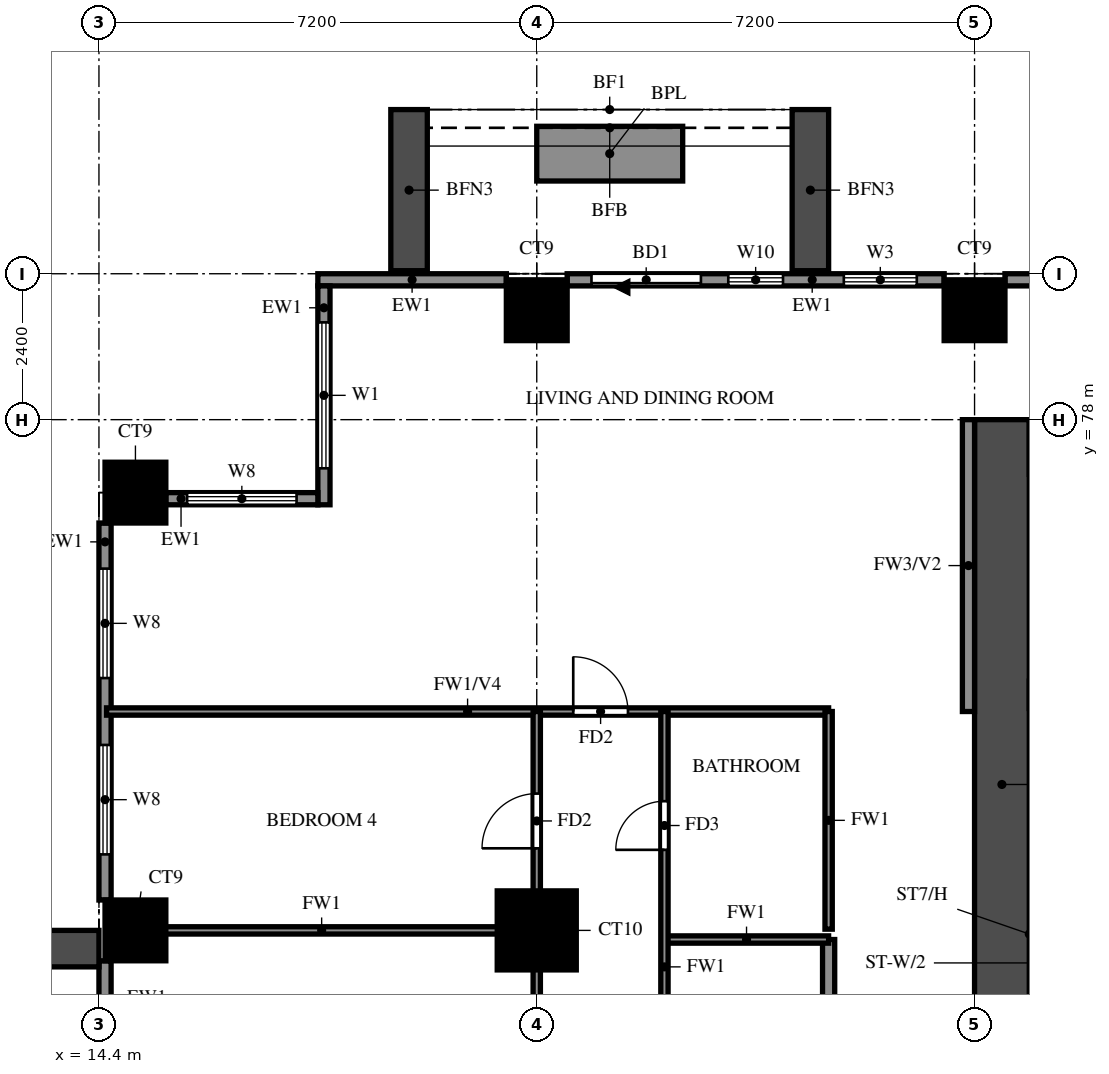
"""IFC4 building model, lengths in metres.
Left out: names, types, materials, properties, quantities, classifications, styles, units other than length and angle.
Written with IfcOpenShell. Run it as: python <this file> out.ifc"""

import sys

from ifc_helpers import new_model, si_unit, direction, frame, frame_2d, origin, origin_2d, place, context, subcontext, project, spatial, rectangle, extrude, source, transform, mapped, element, fill, save


model = new_model("IFC4")
c1 = context("Model", 3, precision=1e-05, world=origin(), true_north=direction((0.0, 1.0)))
c2 = subcontext(c1, "Body", "Model", "MODEL_VIEW")
j1 = project(units=[si_unit("LENGTHUNIT", "METRE"), si_unit("PLANEANGLEUNIT", "RADIAN")], contexts=[c1])
p1 = place(None, origin())
s1 = spatial("IfcSite", under=j1, at=p1, CompositionType="ELEMENT")
p2 = place(p1, origin())
s2 = spatial("IfcBuilding", under=s1, at=p2, CompositionType="ELEMENT")
p3 = place(p2, frame((0.0, 0.0, 79.5)))
s3 = spatial("IfcBuildingStorey", under=s2, at=p3, CompositionType="ELEMENT", Elevation=79.5)
m1 = source(origin(), c2, "Body", "SweptSolid", [
    extrude(rectangle(XDim=1.0, YDim=1.0, at=origin_2d()), origin(), (0.0, 0.0, 1.0), 3.18),
])
p4 = place(p3, frame((15.0, 69.6, 0.0), z_axis=(0.0, 0.0, 1.0), x_axis=(1.0, 0.0, 0.0)))
e1 = element("IfcColumn", 1, at=p4, inside=s3, PredefinedType="COLUMN", context=c2, shape_type="MappedRepresentation", body=[
    mapped(m1, transform((0.0, 0.0, 0.0))),
])
m2 = source(origin(), c2, "Body", "SweptSolid", [
    extrude(rectangle(XDim=1.3, YDim=1.3, at=origin_2d()), origin(), (0.0, 0.0, 1.0), 3.18),
])
p5 = place(p3, frame((21.6, 69.6, 0.0), z_axis=(0.0, 0.0, 1.0), x_axis=(1.0, 0.0, 0.0)))
e2 = element("IfcColumn", 2, at=p5, inside=s3, PredefinedType="COLUMN", context=c2, shape_type="MappedRepresentation", body=[
    mapped(m2, transform((0.0, 0.0, 0.0))),
])
for number, where, z_axis, x_axis in (
    (3, (15.0, 76.8, 0.0), (0.0, 0.0, 1.0), (1.0, 0.0, 0.0)),
    (4, (21.6, 79.8, 0.0), (0.0, 0.0, 1.0), (1.0, 0.0, 0.0)),
    (5, (28.8, 79.8, 0.0), (0.0, 0.0, 1.0), (1.0, 0.0, 0.0)),
):
    element("IfcColumn", number, at=place(p3, frame(where, z_axis=z_axis, x_axis=x_axis)), inside=s3, PredefinedType="COLUMN", context=c2, shape_type="MappedRepresentation", body=[
        mapped(m1, transform((0.0, 0.0, 0.0))),
    ])
p6 = place(p3, frame((29.25, 66.0, 0.0), z_axis=(0.0, 0.0, 1.0), x_axis=(0.0, 1.0, 0.0)))
e6 = element("IfcWall", 6, at=p6, inside=s3, PredefinedType="SHEAR", context=c2, shape_type="SweptSolid", body=[
    extrude(rectangle(XDim=12.0, YDim=0.9, at=frame_2d((6.0, 0.0))), origin(), (0.0, 0.0, 1.0), 3.18),
])
p7 = place(p3, frame((29.7, 73.475, 0.0), z_axis=(0.0, 0.0, 1.0), x_axis=(1.0, 0.0, 0.0)))
e7 = element("IfcWall", 7, at=p7, inside=s3, PredefinedType="SHEAR", context=c2, shape_type="SweptSolid", body=[
    extrude(rectangle(XDim=3.175, YDim=0.45, at=frame_2d((1.587, 0.0))), origin(), (0.0, 0.0, 1.0), 3.18),
])
p8 = place(p3, frame((35.5, 80.3, 0.0), z_axis=(0.0, 0.0, 1.0), x_axis=(-1.0, 0.0, 0.0)))
e8 = element("IfcWall", 8, at=p8, inside=s3, PredefinedType="SOLIDWALL", context=c2, shape_type="SweptSolid", body=[
    extrude(rectangle(XDim=6.2, YDim=0.2, at=frame_2d((3.1, 0.0))), origin(), (0.0, 0.0, 1.0), 3.18),
])
p9 = place(p3, frame((28.3, 80.3, 0.0), z_axis=(0.0, 0.0, 1.0), x_axis=(-1.0, 0.0, 0.0)))
e9 = element("IfcWall", 9, at=p9, inside=s3, PredefinedType="SOLIDWALL", context=c2, shape_type="SweptSolid", body=[
    extrude(rectangle(XDim=6.2, YDim=0.2, at=frame_2d((3.1, 0.0))), origin(), (0.0, 0.0, 1.0), 3.18),
])
p10 = place(p9, frame((4.0, 0.0, 0.0)))
e10 = element("IfcOpeningElement", 10, at=p10, cuts=e9, PredefinedType="OPENING", context=c2, shape_type="SweptSolid", body=[
    extrude(rectangle(XDim=1.8, YDim=2.4, at=frame_2d((0.9, 1.2))), frame((0.0, 0.11, 0.0), z_axis=(0.0, -1.0, 0.0), x_axis=(1.0, 0.0, 0.0)), (0.0, 0.0, 1.0), 0.22),
])
p11 = place(p9, frame((0.45, 0.0, 0.6)))
e11 = element("IfcOpeningElement", 11, at=p11, cuts=e9, PredefinedType="OPENING", context=c2, shape_type="SweptSolid", body=[
    extrude(rectangle(XDim=1.2, YDim=2.4, at=frame_2d((0.6, 1.2))), frame((0.0, 0.11, 0.0), z_axis=(0.0, -1.0, 0.0), x_axis=(1.0, 0.0, 0.0)), (0.0, 0.0, 1.0), 0.22),
])
p12 = place(p9, frame((2.65, 0.0, 0.6)))
e12 = element("IfcOpeningElement", 12, at=p12, cuts=e9, PredefinedType="OPENING", context=c2, shape_type="SweptSolid", body=[
    extrude(rectangle(XDim=0.9, YDim=2.4, at=frame_2d((0.45, 1.2))), frame((0.0, 0.11, 0.0), z_axis=(0.0, -1.0, 0.0), x_axis=(1.0, 0.0, 0.0)), (0.0, 0.0, 1.0), 0.22),
])
p13 = place(p3, frame((21.1, 80.3, 0.0), z_axis=(0.0, 0.0, 1.0), x_axis=(-1.0, 0.0, 0.0)))
e13 = element("IfcWall", 13, at=p13, inside=s3, PredefinedType="SOLIDWALL", context=c2, shape_type="SweptSolid", body=[
    extrude(rectangle(XDim=3.1, YDim=0.2, at=frame_2d((1.55, 0.0))), origin(), (0.0, 0.0, 1.0), 3.18),
])
p14 = place(p3, frame((18.1, 80.2, 0.0), z_axis=(0.0, 0.0, 1.0), x_axis=(0.0, -1.0, 0.0)))
e14 = element("IfcWall", 14, at=p14, inside=s3, PredefinedType="SOLIDWALL", context=c2, shape_type="SweptSolid", body=[
    extrude(rectangle(XDim=3.6, YDim=0.2, at=frame_2d((1.8, 0.0))), origin(), (0.0, 0.0, 1.0), 3.18),
])
p15 = place(p14, frame((0.6, 0.0, 0.6)))
e15 = element("IfcOpeningElement", 15, at=p15, cuts=e14, PredefinedType="OPENING", context=c2, shape_type="SweptSolid", body=[
    extrude(rectangle(XDim=2.4, YDim=2.4, at=frame_2d((1.2, 1.2))), frame((0.0, 0.11, 0.0), z_axis=(0.0, -1.0, 0.0), x_axis=(1.0, 0.0, 0.0)), (0.0, 0.0, 1.0), 0.22),
])
p16 = place(p3, frame((18.0, 76.7, 0.0), z_axis=(0.0, 0.0, 1.0), x_axis=(-1.0, 0.0, 0.0)))
e16 = element("IfcWall", 16, at=p16, inside=s3, PredefinedType="SOLIDWALL", context=c2, shape_type="SweptSolid", body=[
    extrude(rectangle(XDim=2.5, YDim=0.2, at=frame_2d((1.25, 0.0))), origin(), (0.0, 0.0, 1.0), 3.18),
])
p17 = place(p16, frame((0.35, 0.0, 0.6)))
e17 = element("IfcOpeningElement", 17, at=p17, cuts=e16, PredefinedType="OPENING", context=c2, shape_type="SweptSolid", body=[
    extrude(rectangle(XDim=1.8, YDim=2.4, at=frame_2d((0.9, 1.2))), frame((0.0, 0.11, 0.0), z_axis=(0.0, -1.0, 0.0), x_axis=(1.0, 0.0, 0.0)), (0.0, 0.0, 1.0), 0.22),
])
p18 = place(p3, frame((14.5, 76.3, 0.0), z_axis=(0.0, 0.0, 1.0), x_axis=(0.0, -1.0, 0.0)))
e18 = element("IfcWall", 18, at=p18, inside=s3, PredefinedType="SOLIDWALL", context=c2, shape_type="SweptSolid", body=[
    extrude(rectangle(XDim=6.2, YDim=0.2, at=frame_2d((3.1, 0.0))), origin(), (0.0, 0.0, 1.0), 3.18),
])
p19 = place(p18, frame((3.65, 0.0, 0.6)))
e19 = element("IfcOpeningElement", 19, at=p19, cuts=e18, PredefinedType="OPENING", context=c2, shape_type="SweptSolid", body=[
    extrude(rectangle(XDim=1.8, YDim=2.4, at=frame_2d((0.9, 1.2))), frame((0.0, 0.11, 0.0), z_axis=(0.0, -1.0, 0.0), x_axis=(1.0, 0.0, 0.0)), (0.0, 0.0, 1.0), 0.22),
])
p20 = place(p18, frame((0.75, 0.0, 0.6)))
e20 = element("IfcOpeningElement", 20, at=p20, cuts=e18, PredefinedType="OPENING", context=c2, shape_type="SweptSolid", body=[
    extrude(rectangle(XDim=1.8, YDim=2.4, at=frame_2d((0.9, 1.2))), frame((0.0, 0.11, 0.0), z_axis=(0.0, -1.0, 0.0), x_axis=(1.0, 0.0, 0.0)), (0.0, 0.0, 1.0), 0.22),
])
p21 = place(p3, frame((14.5, 69.1, 0.0), z_axis=(0.0, 0.0, 1.0), x_axis=(0.0, -1.0, 0.0)))
e21 = element("IfcWall", 21, at=p21, inside=s3, PredefinedType="SOLIDWALL", context=c2, shape_type="SweptSolid", body=[
    extrude(rectangle(XDim=6.2, YDim=0.2, at=frame_2d((3.1, 0.0))), origin(), (0.0, 0.0, 1.0), 3.18),
])
p22 = place(p21, frame((1.0, 0.0, 0.0)))
e22 = element("IfcOpeningElement", 22, at=p22, cuts=e21, PredefinedType="OPENING", context=c2, shape_type="SweptSolid", body=[
    extrude(rectangle(XDim=1.8, YDim=2.4, at=frame_2d((0.9, 1.2))), frame((0.0, 0.11, 0.0), z_axis=(0.0, -1.0, 0.0), x_axis=(1.0, 0.0, 0.0)), (0.0, 0.0, 1.0), 0.22),
])
p23 = place(p21, frame((3.65, 0.0, 0.6)))
e23 = element("IfcOpeningElement", 23, at=p23, cuts=e21, PredefinedType="OPENING", context=c2, shape_type="SweptSolid", body=[
    extrude(rectangle(XDim=1.8, YDim=2.4, at=frame_2d((0.9, 1.2))), frame((0.0, 0.11, 0.0), z_axis=(0.0, -1.0, 0.0), x_axis=(1.0, 0.0, 0.0)), (0.0, 0.0, 1.0), 0.22),
])
for number, where, z_axis, x_axis in (
    (24, (26.1, 80.45, 0.0), (0.0, 0.0, 1.0), (0.0, 1.0, 0.0)),
    (25, (19.5, 80.45, 0.0), (0.0, 0.0, 1.0), (0.0, 1.0, 0.0)),
):
    element("IfcWall", number, at=place(p3, frame(where, z_axis=z_axis, x_axis=x_axis)), inside=s3, PredefinedType="SOLIDWALL", context=c2, shape_type="SweptSolid", body=[
        extrude(rectangle(XDim=2.65, YDim=0.6, at=frame_2d((1.325, 0.0))), origin(), (0.0, 0.0, 1.0), 2.85),
    ])
p24 = place(p3, frame((24.0, 82.375, 0.0), z_axis=(0.0, 0.0, 1.0), x_axis=(-1.0, 0.0, 0.0)))
e26 = element("IfcWall", 26, at=p24, inside=s3, PredefinedType="SOLIDWALL", context=c2, shape_type="SweptSolid", body=[
    extrude(rectangle(XDim=2.4, YDim=0.9, at=frame_2d((1.2, 0.0))), origin(), (0.0, 0.0, 1.0), 0.9),
])
p25 = place(p3, frame((14.4, 69.3, 0.0), z_axis=(0.0, 0.0, 1.0), x_axis=(-1.0, 0.0, 0.0)))
e27 = element("IfcWall", 27, at=p25, inside=s3, PredefinedType="SOLIDWALL", context=c2, shape_type="SweptSolid", body=[
    extrude(rectangle(XDim=2.7, YDim=0.6, at=frame_2d((1.35, 0.0))), origin(), (0.0, 0.0, 1.0), 2.85),
])
p26 = place(p3, frame((26.4, 60.0, 0.0), z_axis=(0.0, 0.0, 1.0), x_axis=(0.0, 1.0, 0.0)))
e28 = element("IfcWall", 28, at=p26, inside=s3, PredefinedType="SOLIDWALL", context=c2, shape_type="SweptSolid", body=[
    extrude(rectangle(XDim=9.45, YDim=0.2, at=frame_2d((4.725, 0.0))), origin(), (0.0, 0.0, 1.0), 3.18),
])
p27 = place(p26, frame((0.7, 0.0, 0.0)))
e29 = element("IfcOpeningElement", 29, at=p27, cuts=e28, PredefinedType="OPENING", context=c2, shape_type="SweptSolid", body=[
    extrude(rectangle(XDim=1.0, YDim=2.1, at=frame_2d((0.5, 1.05))), frame((0.0, 0.11, 0.0), z_axis=(0.0, -1.0, 0.0), x_axis=(1.0, 0.0, 0.0)), (0.0, 0.0, 1.0), 0.22),
])
p28 = place(p26, frame((3.1, 0.0, 0.0)))
e30 = element("IfcOpeningElement", 30, at=p28, cuts=e28, PredefinedType="OPENING", context=c2, shape_type="SweptSolid", body=[
    extrude(rectangle(XDim=1.0, YDim=2.1, at=frame_2d((0.5, 1.05))), frame((0.0, 0.11, 0.0), z_axis=(0.0, -1.0, 0.0), x_axis=(1.0, 0.0, 0.0)), (0.0, 0.0, 1.0), 0.22),
])
p29 = place(p3, frame((28.7, 73.2, 0.0), z_axis=(0.0, 0.0, 1.0), x_axis=(0.0, 1.0, 0.0)))
e31 = element("IfcWall", 31, at=p29, inside=s3, PredefinedType="SOLIDWALL", context=c2, shape_type="SweptSolid", body=[
    extrude(rectangle(XDim=4.8, YDim=0.2, at=frame_2d((2.4, 0.0))), origin(), (0.0, 0.0, 1.0), 3.18),
])
p30 = place(p3, frame((23.7, 69.45, 0.0), z_axis=(0.0, 0.0, 1.0), x_axis=(1.0, 0.0, 0.0)))
e32 = element("IfcWall", 32, at=p30, inside=s3, PredefinedType="PARTITIONING", context=c2, shape_type="SweptSolid", body=[
    extrude(rectangle(XDim=2.7, YDim=0.12, at=frame_2d((1.35, 0.0))), origin(), (0.0, 0.0, 1.0), 3.18),
])
p31 = place(p3, frame((14.525, 69.6, 0.0), z_axis=(0.0, 0.0, 1.0), x_axis=(1.0, 0.0, 0.0)))
e33 = element("IfcWall", 33, at=p31, inside=s3, PredefinedType="PARTITIONING", context=c2, shape_type="SweptSolid", body=[
    extrude(rectangle(XDim=7.075, YDim=0.12, at=frame_2d((3.538, 0.0))), origin(), (0.0, 0.0, 1.0), 3.18),
])
p32 = place(p3, frame((14.525, 73.2, 0.0), z_axis=(0.0, 0.0, 1.0), x_axis=(1.0, 0.0, 0.0)))
e34 = element("IfcWall", 34, at=p32, inside=s3, PredefinedType="PARTITIONING", context=c2, shape_type="SweptSolid", body=[
    extrude(rectangle(XDim=11.875, YDim=0.12, at=frame_2d((5.938, 0.0))), origin(), (0.0, 0.0, 1.0), 2.28),
])
p33 = place(p32, frame((7.675, 0.0, 0.0)))
e35 = element("IfcOpeningElement", 35, at=p33, cuts=e34, PredefinedType="OPENING", context=c2, shape_type="SweptSolid", body=[
    extrude(rectangle(XDim=0.9, YDim=2.1, at=frame_2d((0.45, 1.05))), frame((0.0, 0.07, 0.0), z_axis=(0.0, -1.0, 0.0), x_axis=(1.0, 0.0, 0.0)), (0.0, 0.0, 1.0), 0.14),
])
p34 = place(p3, frame((21.6, 33.725, 0.0), z_axis=(0.0, 0.0, 1.0), x_axis=(0.0, 1.0, 0.0)))
e36 = element("IfcWall", 36, at=p34, inside=s3, PredefinedType="PARTITIONING", context=c2, shape_type="SweptSolid", body=[
    extrude(rectangle(XDim=39.475, YDim=0.12, at=frame_2d((19.737, 0.0))), origin(), (0.0, 0.0, 1.0), 3.18),
])
p35 = place(p34, frame((7.775, 0.0, 0.0)))
e37 = element("IfcOpeningElement", 37, at=p35, cuts=e36, PredefinedType="OPENING", context=c2, shape_type="SweptSolid", body=[
    extrude(rectangle(XDim=0.9, YDim=2.1, at=frame_2d((0.45, 1.05))), frame((0.0, 0.07, 0.0), z_axis=(0.0, -1.0, 0.0), x_axis=(1.0, 0.0, 0.0)), (0.0, 0.0, 1.0), 0.14),
])
p36 = place(p34, frame((17.125, 0.0, 0.0)))
e38 = element("IfcOpeningElement", 38, at=p36, cuts=e36, PredefinedType="OPENING", context=c2, shape_type="SweptSolid", body=[
    extrude(rectangle(XDim=1.5, YDim=2.1, at=frame_2d((0.75, 1.05))), frame((0.0, 0.07, 0.0), z_axis=(0.0, -1.0, 0.0), x_axis=(1.0, 0.0, 0.0)), (0.0, 0.0, 1.0), 0.14),
])
p37 = place(p34, frame((22.825, 0.0, 0.0)))
e39 = element("IfcOpeningElement", 39, at=p37, cuts=e36, PredefinedType="OPENING", context=c2, shape_type="SweptSolid", body=[
    extrude(rectangle(XDim=0.9, YDim=2.1, at=frame_2d((0.45, 1.05))), frame((0.0, 0.07, 0.0), z_axis=(0.0, -1.0, 0.0), x_axis=(1.0, 0.0, 0.0)), (0.0, 0.0, 1.0), 0.14),
])
p38 = place(p34, frame((26.425, 0.0, 0.0)))
e40 = element("IfcOpeningElement", 40, at=p38, cuts=e36, PredefinedType="OPENING", context=c2, shape_type="SweptSolid", body=[
    extrude(rectangle(XDim=0.9, YDim=2.1, at=frame_2d((0.45, 1.05))), frame((0.0, 0.07, 0.0), z_axis=(0.0, -1.0, 0.0), x_axis=(1.0, 0.0, 0.0)), (0.0, 0.0, 1.0), 0.14),
])
p39 = place(p34, frame((30.025, 0.0, 0.0)))
e41 = element("IfcOpeningElement", 41, at=p39, cuts=e36, PredefinedType="OPENING", context=c2, shape_type="SweptSolid", body=[
    extrude(rectangle(XDim=0.9, YDim=2.1, at=frame_2d((0.45, 1.05))), frame((0.0, 0.07, 0.0), z_axis=(0.0, -1.0, 0.0), x_axis=(1.0, 0.0, 0.0)), (0.0, 0.0, 1.0), 0.14),
])
p40 = place(p34, frame((33.625, 0.0, 0.0)))
e42 = element("IfcOpeningElement", 42, at=p40, cuts=e36, PredefinedType="OPENING", context=c2, shape_type="SweptSolid", body=[
    extrude(rectangle(XDim=0.9, YDim=2.1, at=frame_2d((0.45, 1.05))), frame((0.0, 0.07, 0.0), z_axis=(0.0, -1.0, 0.0), x_axis=(1.0, 0.0, 0.0)), (0.0, 0.0, 1.0), 0.14),
])
p41 = place(p34, frame((37.225, 0.0, 0.0)))
e43 = element("IfcOpeningElement", 43, at=p41, cuts=e36, PredefinedType="OPENING", context=c2, shape_type="SweptSolid", body=[
    extrude(rectangle(XDim=0.9, YDim=2.1, at=frame_2d((0.45, 1.05))), frame((0.0, 0.07, 0.0), z_axis=(0.0, -1.0, 0.0), x_axis=(1.0, 0.0, 0.0)), (0.0, 0.0, 1.0), 0.14),
])
p42 = place(p3, frame((23.7, 64.8, 0.0), z_axis=(0.0, 0.0, 1.0), x_axis=(0.0, 1.0, 0.0)))
e44 = element("IfcWall", 44, at=p42, inside=s3, PredefinedType="PARTITIONING", context=c2, shape_type="SweptSolid", body=[
    extrude(rectangle(XDim=8.4, YDim=0.12, at=frame_2d((4.2, 0.0))), origin(), (0.0, 0.0, 1.0), 3.18),
])
p43 = place(p42, frame((1.875, 0.0, 0.0)))
e45 = element("IfcOpeningElement", 45, at=p43, cuts=e44, PredefinedType="OPENING", context=c2, shape_type="SweptSolid", body=[
    extrude(rectangle(XDim=0.9, YDim=2.1, at=frame_2d((0.45, 1.05))), frame((0.0, 0.07, 0.0), z_axis=(0.0, -1.0, 0.0), x_axis=(1.0, 0.0, 0.0)), (0.0, 0.0, 1.0), 0.14),
])
p44 = place(p42, frame((6.125, 0.0, 0.0)))
e46 = element("IfcOpeningElement", 46, at=p44, cuts=e44, PredefinedType="OPENING", context=c2, shape_type="SweptSolid", body=[
    extrude(rectangle(XDim=0.8, YDim=2.1, at=frame_2d((0.4, 1.05))), frame((0.0, 0.07, 0.0), z_axis=(0.0, -1.0, 0.0), x_axis=(1.0, 0.0, 0.0)), (0.0, 0.0, 1.0), 0.14),
])
p45 = place(p3, frame((26.4, 69.62, 0.0), z_axis=(0.0, 0.0, 1.0), x_axis=(0.0, 1.0, 0.0)))
e47 = element("IfcWall", 47, at=p45, inside=s3, PredefinedType="PARTITIONING", context=c2, shape_type="SweptSolid", body=[
    extrude(rectangle(XDim=3.58, YDim=0.12, at=frame_2d((1.79, 0.0))), origin(), (0.0, 0.0, 1.0), 3.18),
])
p46 = place(p10, origin())
e48 = element("IfcDoor", 48, at=p46, inside=s3, OperationType="DOUBLE_DOOR_SLIDING", PredefinedType="DOOR", context=c2, shape_type="SweptSolid", body=[
    extrude(rectangle(XDim=1.8, YDim=2.4, at=frame_2d((0.9, 1.2))), frame((0.0, 0.025, 0.0), z_axis=(0.0, -1.0, 0.0), x_axis=(1.0, 0.0, 0.0)), (0.0, 0.0, 1.0), 0.05),
])
fill(e10, e48)
p47 = place(p11, origin())
e49 = element("IfcWindow", 49, at=p47, inside=s3, PartitioningType="SINGLE_PANEL", PredefinedType="WINDOW", context=c2, shape_type="SweptSolid", body=[
    extrude(rectangle(XDim=1.2, YDim=2.4, at=frame_2d((0.6, 1.2))), frame((0.0, 0.03, 0.0), z_axis=(0.0, -1.0, 0.0), x_axis=(1.0, 0.0, 0.0)), (0.0, 0.0, 1.0), 0.06),
])
fill(e11, e49)
p48 = place(p12, origin())
e50 = element("IfcWindow", 50, at=p48, inside=s3, PartitioningType="SINGLE_PANEL", PredefinedType="WINDOW", context=c2, shape_type="SweptSolid", body=[
    extrude(rectangle(XDim=0.9, YDim=2.4, at=frame_2d((0.45, 1.2))), frame((0.0, 0.03, 0.0), z_axis=(0.0, -1.0, 0.0), x_axis=(1.0, 0.0, 0.0)), (0.0, 0.0, 1.0), 0.06),
])
fill(e12, e50)
p49 = place(p15, origin())
e51 = element("IfcWindow", 51, at=p49, inside=s3, PartitioningType="DOUBLE_PANEL_VERTICAL", PredefinedType="WINDOW", context=c2, shape_type="SweptSolid", body=[
    extrude(rectangle(XDim=2.4, YDim=2.4, at=frame_2d((1.2, 1.2))), frame((0.0, 0.03, 0.0), z_axis=(0.0, -1.0, 0.0), x_axis=(1.0, 0.0, 0.0)), (0.0, 0.0, 1.0), 0.06),
])
fill(e15, e51)
p50 = place(p17, origin())
e52 = element("IfcWindow", 52, at=p50, inside=s3, PartitioningType="DOUBLE_PANEL_VERTICAL", PredefinedType="WINDOW", context=c2, shape_type="SweptSolid", body=[
    extrude(rectangle(XDim=1.8, YDim=2.4, at=frame_2d((0.9, 1.2))), frame((0.0, 0.03, 0.0), z_axis=(0.0, -1.0, 0.0), x_axis=(1.0, 0.0, 0.0)), (0.0, 0.0, 1.0), 0.06),
])
fill(e17, e52)
p51 = place(p19, origin())
e53 = element("IfcWindow", 53, at=p51, inside=s3, PartitioningType="DOUBLE_PANEL_VERTICAL", PredefinedType="WINDOW", context=c2, shape_type="SweptSolid", body=[
    extrude(rectangle(XDim=1.8, YDim=2.4, at=frame_2d((0.9, 1.2))), frame((0.0, 0.03, 0.0), z_axis=(0.0, -1.0, 0.0), x_axis=(1.0, 0.0, 0.0)), (0.0, 0.0, 1.0), 0.06),
])
fill(e19, e53)
p52 = place(p20, origin())
e54 = element("IfcWindow", 54, at=p52, inside=s3, PartitioningType="DOUBLE_PANEL_VERTICAL", PredefinedType="WINDOW", context=c2, shape_type="SweptSolid", body=[
    extrude(rectangle(XDim=1.8, YDim=2.4, at=frame_2d((0.9, 1.2))), frame((0.0, 0.03, 0.0), z_axis=(0.0, -1.0, 0.0), x_axis=(1.0, 0.0, 0.0)), (0.0, 0.0, 1.0), 0.06),
])
fill(e20, e54)
p53 = place(p41, origin())
e55 = element("IfcDoor", 55, at=p53, inside=s3, OperationType="SINGLE_SWING_RIGHT", PredefinedType="DOOR", context=c2, shape_type="SweptSolid", body=[
    extrude(rectangle(XDim=0.9, YDim=2.1, at=frame_2d((0.45, 1.05))), frame((0.0, 0.025, 0.0), z_axis=(0.0, -1.0, 0.0), x_axis=(1.0, 0.0, 0.0)), (0.0, 0.0, 1.0), 0.05),
])
fill(e43, e55)
p54 = place(p33, origin())
e56 = element("IfcDoor", 56, at=p54, inside=s3, OperationType="SINGLE_SWING_LEFT", PredefinedType="DOOR", context=c2, shape_type="SweptSolid", body=[
    extrude(rectangle(XDim=0.9, YDim=2.1, at=frame_2d((0.45, 1.05))), frame((0.0, 0.025, 0.0), z_axis=(0.0, -1.0, 0.0), x_axis=(1.0, 0.0, 0.0)), (0.0, 0.0, 1.0), 0.05),
])
fill(e35, e56)
p55 = place(p44, origin())
e57 = element("IfcDoor", 57, at=p55, inside=s3, OperationType="SINGLE_SWING_RIGHT", PredefinedType="DOOR", context=c2, shape_type="SweptSolid", body=[
    extrude(rectangle(XDim=0.8, YDim=2.1, at=frame_2d((0.4, 1.05))), frame((0.0, 0.025, 0.0), z_axis=(0.0, -1.0, 0.0), x_axis=(1.0, 0.0, 0.0)), (0.0, 0.0, 1.0), 0.05),
])
fill(e46, e57)
save(model, sys.argv[1])
